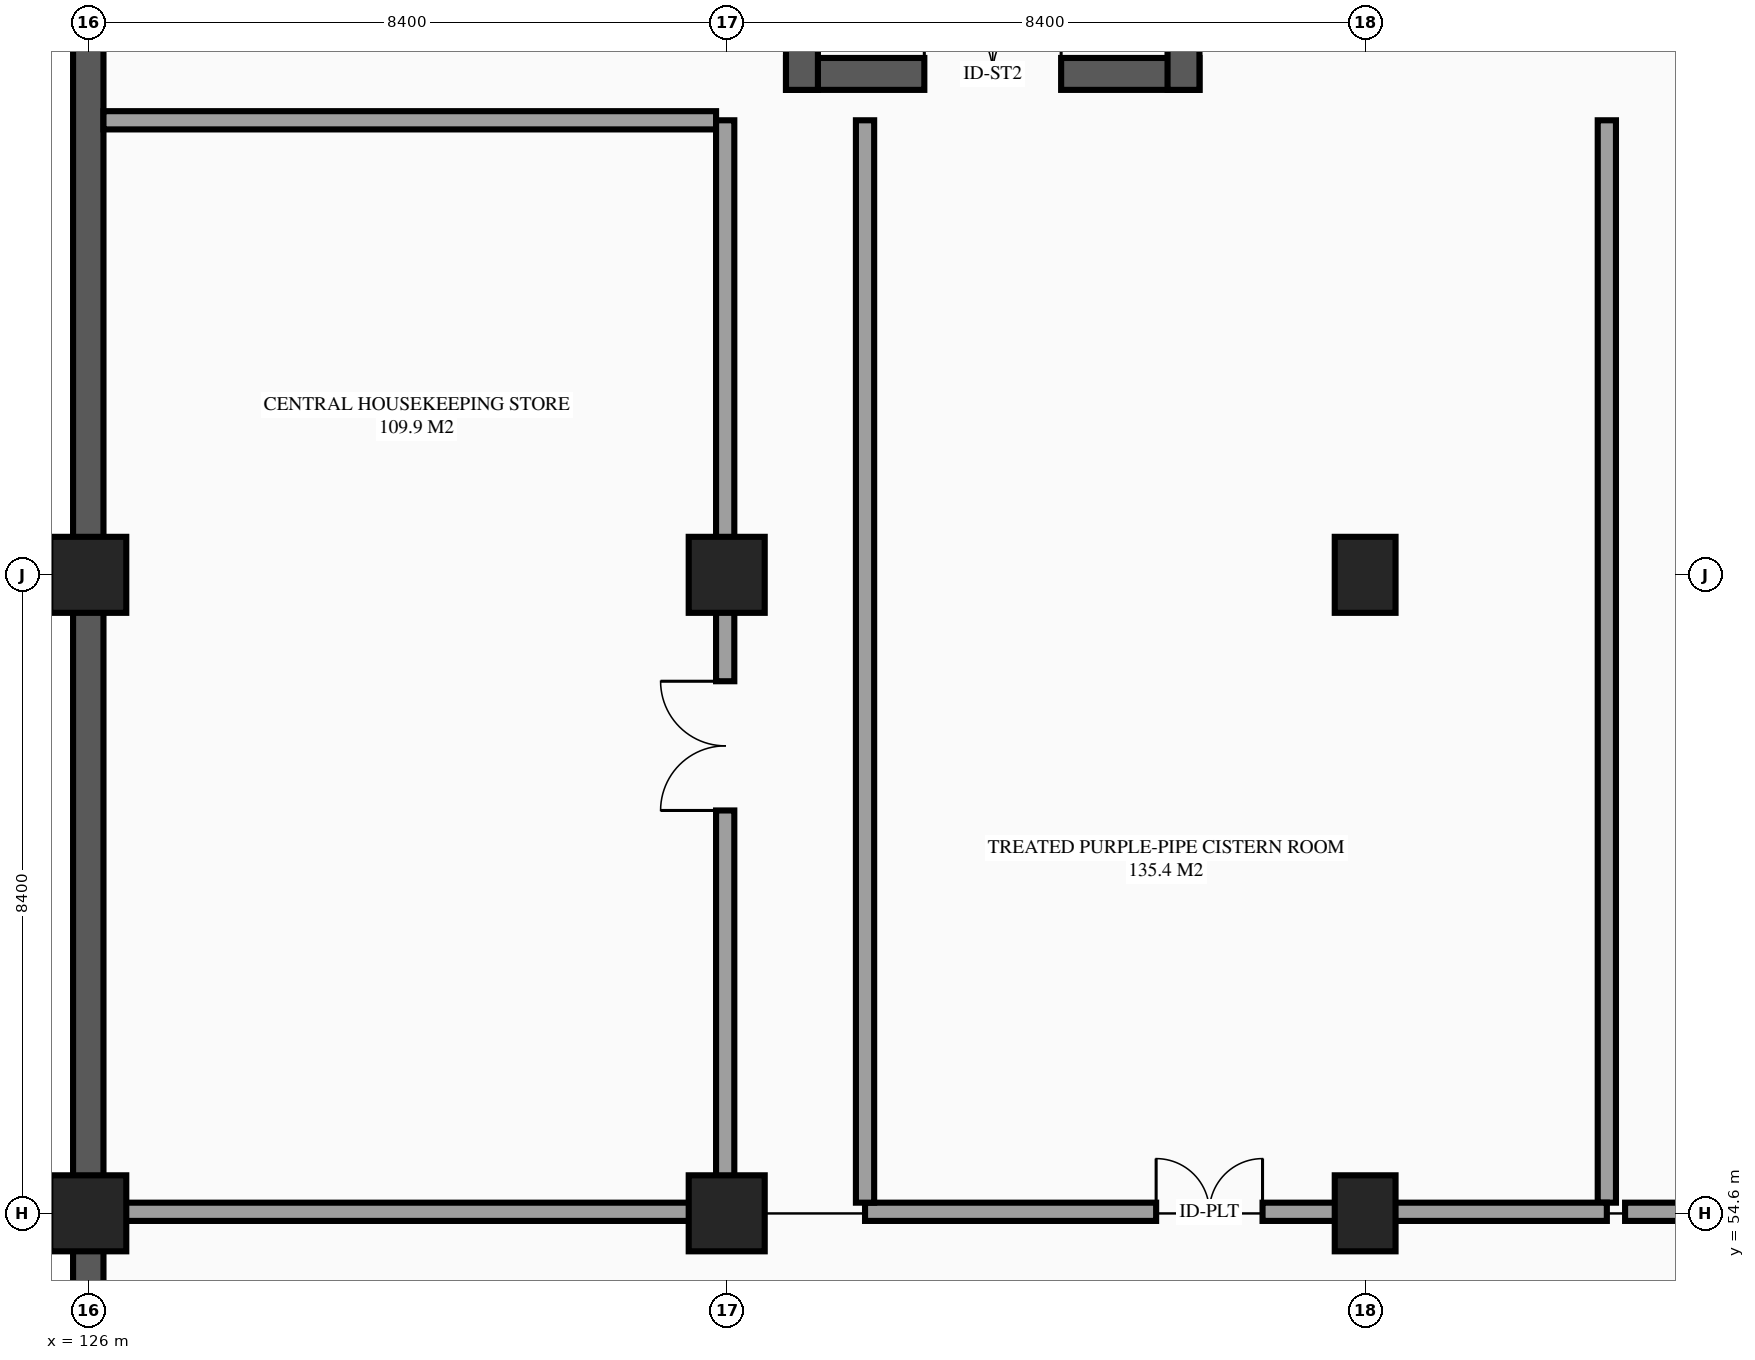
"""IFC4 building model, lengths in metres.
Left out: names, types, materials, properties, quantities, classifications, styles, units other than length and angle.
Written with IfcOpenShell. Run it as: python <this file> out.ifc"""

import sys

from ifc_helpers import new_model, si_unit, direction, frame, frame_2d, origin, origin_2d, place, context, subcontext, project, spatial, rectangle, extrude, element, fill, save


model = new_model("IFC4")
c1 = context("Model", 3, precision=1e-05, world=origin(), true_north=direction((0.0, 1.0)))
c2 = subcontext(c1, "Body", "Model", "MODEL_VIEW")
j1 = project(units=[si_unit("LENGTHUNIT", "METRE"), si_unit("PLANEANGLEUNIT", "RADIAN")], contexts=[c1])
p1 = place(None, origin())
s1 = spatial("IfcSite", under=j1, at=p1, CompositionType="ELEMENT")
p2 = place(p1, origin())
s2 = spatial("IfcBuilding", under=s1, at=p2, CompositionType="ELEMENT")
p3 = place(p2, frame((0.0, 0.0, -4.5)))
s3 = spatial("IfcBuildingStorey", under=s2, at=p3, CompositionType="ELEMENT", Elevation=-4.5)
for number, where, z_axis, x_axis in (
    (1, (126.0, 54.6, -0.36), (0.0, 0.0, 1.0), (1.0, 0.0, 0.0)),
    (2, (126.0, 63.0, -0.36), (0.0, 0.0, 1.0), (1.0, 0.0, 0.0)),
    (3, (134.4, 54.6, -0.36), (0.0, 0.0, 1.0), (1.0, 0.0, 0.0)),
    (4, (134.4, 63.0, -0.36), (0.0, 0.0, 1.0), (1.0, 0.0, 0.0)),
):
    element("IfcColumn", number, at=place(p3, frame(where, z_axis=z_axis, x_axis=x_axis)), inside=s3, PredefinedType="COLUMN", context=c2, shape_type="SweptSolid", body=[
        extrude(rectangle(XDim=1.0, YDim=1.0, at=origin_2d()), origin(), (0.0, 0.0, 1.0), 4.86),
    ])
for number, where, z_axis, x_axis in (
    (5, (142.8, 54.6, -0.36), (0.0, 0.0, 1.0), (1.0, 0.0, 0.0)),
    (6, (142.8, 63.0, -0.36), (0.0, 0.0, 1.0), (1.0, 0.0, 0.0)),
):
    element("IfcColumn", number, at=place(p3, frame(where, z_axis=z_axis, x_axis=x_axis)), inside=s3, PredefinedType="COLUMN", context=c2, shape_type="SweptSolid", body=[
        extrude(rectangle(XDim=0.8, YDim=1.0, at=origin_2d()), origin(), (0.0, 0.0, 1.0), 4.86),
    ])
p4 = place(p3, frame((126.0, 79.8, -0.36), z_axis=(0.0, 0.0, 1.0), x_axis=(0.0, -1.0, 0.0)))
e7 = element("IfcWall", 7, at=p4, inside=s3, PredefinedType="STANDARD", context=c2, shape_type="SweptSolid", body=[
    extrude(rectangle(XDim=50.4, YDim=0.4, at=frame_2d((25.2, 0.0))), origin(), (0.0, 0.0, 1.0), 4.86),
])
p5 = place(p3, frame((135.18, 69.59, 0.0), z_axis=(0.0, 0.0, 1.0), x_axis=(1.0, 0.0, 0.0)))
e8 = element("IfcWall", 8, at=p5, inside=s3, PredefinedType="SHEAR", context=c2, shape_type="SweptSolid", body=[
    extrude(rectangle(XDim=5.44, YDim=0.42, at=frame_2d((2.72, 0.0))), origin(), (0.0, 0.0, 1.0), 4.5),
])
p6 = place(p5, frame((1.82, 0.0, 0.0)))
e9 = element("IfcOpeningElement", 9, at=p6, cuts=e8, PredefinedType="OPENING", context=c2, shape_type="SweptSolid", body=[
    extrude(rectangle(XDim=1.8, YDim=2.2, at=frame_2d((0.9, 1.1))), frame((0.0, 0.22, 0.0), z_axis=(0.0, -1.0, 0.0), x_axis=(1.0, 0.0, 0.0)), (0.0, 0.0, 1.0), 0.44),
])
for number, where, z_axis, x_axis in (
    (10, (140.41, 69.38, 0.0), (0.0, 0.0, 1.0), (0.0, 1.0, 0.0)),
    (11, (135.39, 78.46, 0.0), (0.0, 0.0, 1.0), (0.0, -1.0, 0.0)),
):
    element("IfcWall", number, at=place(p3, frame(where, z_axis=z_axis, x_axis=x_axis)), inside=s3, PredefinedType="SHEAR", context=c2, shape_type="SweptSolid", body=[
        extrude(rectangle(XDim=9.08, YDim=0.42, at=frame_2d((4.54, 0.0))), origin(), (0.0, 0.0, 1.0), 4.5),
    ])
p7 = place(p3, frame((136.22, 54.62, 0.0), z_axis=(0.0, 0.0, 1.0), x_axis=(1.0, 0.0, 0.0)))
e12 = element("IfcWall", 12, at=p7, inside=s3, PredefinedType="PARTITIONING", context=c2, shape_type="SweptSolid", body=[
    extrude(rectangle(XDim=6.58, YDim=0.24, at=frame_2d((3.29, 0.0))), origin(), (0.0, 0.0, 1.0), 3.33),
])
p8 = place(p7, frame((3.83, 0.0, 0.0)))
e13 = element("IfcOpeningElement", 13, at=p8, cuts=e12, PredefinedType="OPENING", context=c2, shape_type="SweptSolid", body=[
    extrude(rectangle(XDim=1.4, YDim=2.2, at=frame_2d((0.7, 1.1))), frame((0.0, 0.13, 0.0), z_axis=(0.0, -1.0, 0.0), x_axis=(1.0, 0.0, 0.0)), (0.0, 0.0, 1.0), 0.26),
])
for number, where, z_axis, x_axis in (
    (14, (136.22, 54.74, 0.0), (0.0, 0.0, 1.0), (0.0, 1.0, 0.0)),
    (15, (145.98, 54.74, 0.0), (0.0, 0.0, 1.0), (0.0, 1.0, 0.0)),
):
    element("IfcWall", number, at=place(p3, frame(where, z_axis=z_axis, x_axis=x_axis)), inside=s3, PredefinedType="PARTITIONING", context=c2, shape_type="SweptSolid", body=[
        extrude(rectangle(XDim=14.24, YDim=0.24, at=frame_2d((7.12, 0.0))), origin(), (0.0, 0.0, 1.0), 4.175),
    ])
p9 = place(p3, frame((146.22, 54.62, 0.0), z_axis=(0.0, 0.0, 1.0), x_axis=(1.0, 0.0, 0.0)))
e16 = element("IfcWall", 16, at=p9, inside=s3, PredefinedType="PARTITIONING", context=c2, shape_type="SweptSolid", body=[
    extrude(rectangle(XDim=29.98, YDim=0.24, at=frame_2d((14.99, 0.0))), origin(), (0.0, 0.0, 1.0), 3.43),
])
p10 = place(p9, frame((14.84, 0.0, 0.0)))
e17 = element("IfcOpeningElement", 17, at=p10, cuts=e16, PredefinedType="OPENING", context=c2, shape_type="SweptSolid", body=[
    extrude(rectangle(XDim=1.7, YDim=2.2, at=frame_2d((0.85, 1.1))), frame((0.0, 0.13, 0.0), z_axis=(0.0, -1.0, 0.0), x_axis=(1.0, 0.0, 0.0)), (0.0, 0.0, 1.0), 0.26),
])
p11 = place(p3, frame((134.38, 54.62, 0.0), z_axis=(0.0, 0.0, 1.0), x_axis=(0.0, 1.0, 0.0)))
e18 = element("IfcWall", 18, at=p11, inside=s3, PredefinedType="PARTITIONING", context=c2, shape_type="SweptSolid", body=[
    extrude(rectangle(XDim=8.38, YDim=0.24, at=frame_2d((4.19, 0.0))), origin(), (0.0, 0.0, 1.0), 3.48),
])
p12 = place(p11, frame((5.28, 0.0, 0.0)))
e19 = element("IfcOpeningElement", 19, at=p12, cuts=e18, PredefinedType="OPENING", context=c2, shape_type="SweptSolid", body=[
    extrude(rectangle(XDim=1.7, YDim=2.2, at=frame_2d((0.85, 1.1))), frame((0.0, 0.13, 0.0), z_axis=(0.0, -1.0, 0.0), x_axis=(1.0, 0.0, 0.0)), (0.0, 0.0, 1.0), 0.26),
])
p13 = place(p3, frame((126.2, 54.62, 0.0), z_axis=(0.0, 0.0, 1.0), x_axis=(1.0, 0.0, 0.0)))
e20 = element("IfcWall", 20, at=p13, inside=s3, PredefinedType="PARTITIONING", context=c2, shape_type="SweptSolid", body=[
    extrude(rectangle(XDim=8.06, YDim=0.24, at=frame_2d((4.03, 0.0))), origin(), (0.0, 0.0, 1.0), 3.38),
])
p14 = place(p3, frame((126.2, 68.98, 0.0), z_axis=(0.0, 0.0, 1.0), x_axis=(1.0, 0.0, 0.0)))
e21 = element("IfcWall", 21, at=p14, inside=s3, PredefinedType="PARTITIONING", context=c2, shape_type="SweptSolid", body=[
    extrude(rectangle(XDim=8.06, YDim=0.24, at=frame_2d((4.03, 0.0))), origin(), (0.0, 0.0, 1.0), 4.175),
])
p15 = place(p3, frame((142.8, 54.62, 0.0), z_axis=(0.0, 0.0, 1.0), x_axis=(1.0, 0.0, 0.0)))
e22 = element("IfcWall", 22, at=p15, inside=s3, PredefinedType="PARTITIONING", context=c2, shape_type="SweptSolid", body=[
    extrude(rectangle(XDim=3.18, YDim=0.24, at=frame_2d((1.59, 0.0))), origin(), (0.0, 0.0, 1.0), 3.43),
])
p16 = place(p3, frame((134.38, 63.0, 0.0), z_axis=(0.0, 0.0, 1.0), x_axis=(0.0, 1.0, 0.0)))
e23 = element("IfcWall", 23, at=p16, inside=s3, PredefinedType="PARTITIONING", context=c2, shape_type="SweptSolid", body=[
    extrude(rectangle(XDim=5.98, YDim=0.24, at=frame_2d((2.99, 0.0))), origin(), (0.0, 0.0, 1.0), 3.58),
])
p17 = place(p6, origin())
e24 = element("IfcDoor", 24, at=p17, inside=s3, OperationType="DOUBLE_DOOR_SINGLE_SWING", PredefinedType="DOOR", context=c2, shape_type="SweptSolid", body=[
    extrude(rectangle(XDim=1.8, YDim=2.2, at=frame_2d((0.9, 1.1))), frame((0.0, 0.025, 0.0), z_axis=(0.0, -1.0, 0.0), x_axis=(1.0, 0.0, 0.0)), (0.0, 0.0, 1.0), 0.05),
])
fill(e9, e24)
p18 = place(p8, origin())
e25 = element("IfcDoor", 25, at=p18, inside=s3, OperationType="DOUBLE_DOOR_SINGLE_SWING", PredefinedType="DOOR", context=c2, shape_type="SweptSolid", body=[
    extrude(rectangle(XDim=1.4, YDim=2.2, at=frame_2d((0.7, 1.1))), frame((0.0, 0.025, 0.0), z_axis=(0.0, -1.0, 0.0), x_axis=(1.0, 0.0, 0.0)), (0.0, 0.0, 1.0), 0.05),
])
fill(e13, e25)
p19 = place(p12, origin())
e26 = element("IfcDoor", 26, at=p19, inside=s3, OperationType="DOUBLE_DOOR_SINGLE_SWING", PredefinedType="DOOR", context=c2, shape_type="SweptSolid", body=[
    extrude(rectangle(XDim=1.7, YDim=2.2, at=frame_2d((0.85, 1.1))), frame((0.0, 0.025, 0.0), z_axis=(0.0, -1.0, 0.0), x_axis=(1.0, 0.0, 0.0)), (0.0, 0.0, 1.0), 0.05),
])
fill(e19, e26)
save(model, sys.argv[1])
